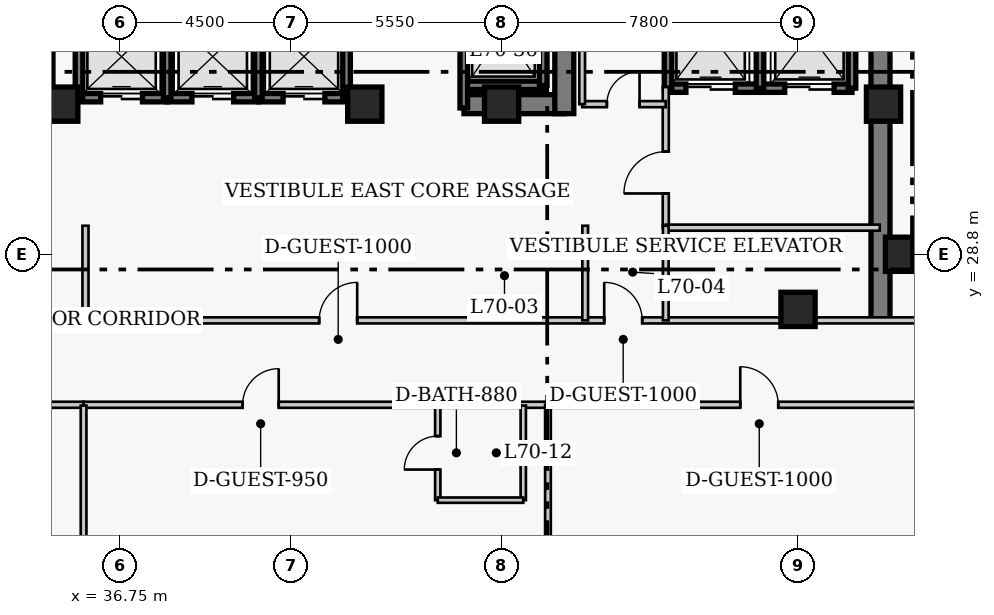
"""IFC4 building model, lengths in metres.
Left out: names, types, materials, properties, quantities, classifications, styles, units other than length and angle.
Written with IfcOpenShell. Run it as: python <this file> out.ifc"""

import sys

from ifc_helpers import new_model, si_unit, direction, frame, frame_2d, origin, origin_2d, place, context, subcontext, project, spatial, rectangle, extrude, element, fill, save


model = new_model("IFC4")
c1 = context("Model", 3, precision=1e-05, world=origin(), true_north=direction((0.0, 1.0)))
c2 = subcontext(c1, "Body", "Model", "MODEL_VIEW")
j1 = project(units=[si_unit("LENGTHUNIT", "METRE"), si_unit("PLANEANGLEUNIT", "RADIAN")], contexts=[c1])
p1 = place(None, origin())
s1 = spatial("IfcSite", under=j1, at=p1, CompositionType="ELEMENT")
p2 = place(p1, origin())
s2 = spatial("IfcBuilding", under=s1, at=p2, CompositionType="ELEMENT")
p3 = place(p2, frame((0.0, 0.0, 281.4)))
s3 = spatial("IfcBuildingStorey", under=s2, at=p3, CompositionType="ELEMENT", Elevation=281.4)
p4 = place(p3, frame((56.77, 27.05, 0.0), z_axis=(0.0, 0.0, 1.0), x_axis=(0.0, 1.0, 0.0)))
e1 = element("IfcWall", 1, at=p4, inside=s3, PredefinedType="SHEAR", context=c2, shape_type="SweptSolid", body=[
    extrude(rectangle(XDim=13.52, YDim=0.5, at=frame_2d((6.76, 0.0))), origin(), (0.0, 0.0, 1.0), 4.0),
])
p5 = place(p3, frame((45.81, 32.75, 0.0), z_axis=(0.0, 0.0, 1.0), x_axis=(1.0, 0.0, 0.0)))
e2 = element("IfcWall", 2, at=p5, inside=s3, PredefinedType="SHEAR", context=c2, shape_type="SweptSolid", body=[
    extrude(rectangle(XDim=2.64, YDim=0.5, at=frame_2d((1.32, 0.0))), origin(), (0.0, 0.0, 1.0), 4.0),
])
p6 = place(p3, frame((48.45, 32.5, 0.0), z_axis=(0.0, 0.0, 1.0), x_axis=(0.0, 1.0, 0.0)))
e3 = element("IfcWall", 3, at=p6, inside=s3, PredefinedType="SHEAR", context=c2, shape_type="SweptSolid", body=[
    extrude(rectangle(XDim=7.82, YDim=0.5, at=frame_2d((3.91, 0.0))), origin(), (0.0, 0.0, 1.0), 4.0),
])
p7 = place(p6, frame((5.7, 0.0, 0.0)))
e4 = element("IfcOpeningElement", 4, at=p7, cuts=e3, PredefinedType="OPENING", context=c2, shape_type="SweptSolid", body=[
    extrude(rectangle(XDim=1.1, YDim=2.15, at=frame_2d((0.55, 1.075))), frame((0.0, 0.26, 0.0), z_axis=(0.0, -1.0, 0.0), x_axis=(1.0, 0.0, 0.0)), (0.0, 0.0, 1.0), 0.52),
])
for number, where, z_axis, x_axis in (
    (5, (57.35, 28.8, 0.0), (0.0, 0.0, 1.0), (1.0, 0.0, 0.0)),
    (6, (35.2, 32.75, 0.0), (0.0, 0.0, 1.0), (1.0, 0.0, 0.0)),
    (7, (43.2, 32.75, 0.0), (0.0, 0.0, 1.0), (1.0, 0.0, 0.0)),
    (8, (46.8, 32.75, 0.0), (0.0, 0.0, 1.0), (1.0, 0.0, 0.0)),
    (9, (54.6, 27.35, 0.0), (0.0, 0.0, 1.0), (1.0, 0.0, 0.0)),
    (10, (56.85, 32.75, 0.0), (0.0, 0.0, 1.0), (1.0, 0.0, 0.0)),
):
    element("IfcColumn", number, at=place(p3, frame(where, z_axis=z_axis, x_axis=x_axis)), inside=s3, PredefinedType="COLUMN", context=c2, shape_type="SweptSolid", body=[
        extrude(rectangle(XDim=0.9, YDim=0.9, at=origin_2d()), origin(), (0.0, 0.0, 1.0), 4.0),
    ])
p8 = place(p3, frame((35.68, 32.92, 0.0), z_axis=(0.0, 0.0, 1.0), x_axis=(1.0, 0.0, 0.0)))
e11 = element("IfcWall", 11, at=p8, inside=s3, PredefinedType="SHEAR", context=c2, shape_type="SweptSolid", body=[
    extrude(rectangle(XDim=2.32, YDim=0.22, at=frame_2d((1.16, 0.0))), origin(), (0.0, 0.0, 1.0), 4.0),
])
p9 = place(p8, frame((0.57, 0.0, 0.0)))
e12 = element("IfcOpeningElement", 12, at=p9, cuts=e11, PredefinedType="OPENING", context=c2, shape_type="SweptSolid", body=[
    extrude(rectangle(XDim=1.1, YDim=2.15, at=frame_2d((0.55, 1.075))), frame((0.0, 0.12, 0.0), z_axis=(0.0, -1.0, 0.0), x_axis=(1.0, 0.0, 0.0)), (0.0, 0.0, 1.0), 0.24),
])
p10 = place(p3, frame((35.68, 32.92, 0.0), z_axis=(0.0, 0.0, 1.0), x_axis=(0.0, 1.0, 0.0)))
e13 = element("IfcWall", 13, at=p10, inside=s3, PredefinedType="SHEAR", context=c2, shape_type="SweptSolid", body=[
    extrude(rectangle(XDim=2.16, YDim=0.2, at=frame_2d((1.08, 0.0))), origin(), (0.0, 0.0, 1.0), 4.0),
])
p11 = place(p3, frame((38.0, 32.92, 0.0), z_axis=(0.0, 0.0, 1.0), x_axis=(1.0, 0.0, 0.0)))
e14 = element("IfcWall", 14, at=p11, inside=s3, PredefinedType="SHEAR", context=c2, shape_type="SweptSolid", body=[
    extrude(rectangle(XDim=2.4, YDim=0.22, at=frame_2d((1.2, 0.0))), origin(), (0.0, 0.0, 1.0), 4.0),
])
p12 = place(p11, frame((0.65, 0.0, 0.0)))
e15 = element("IfcOpeningElement", 15, at=p12, cuts=e14, PredefinedType="OPENING", context=c2, shape_type="SweptSolid", body=[
    extrude(rectangle(XDim=1.1, YDim=2.15, at=frame_2d((0.55, 1.075))), frame((0.0, 0.12, 0.0), z_axis=(0.0, -1.0, 0.0), x_axis=(1.0, 0.0, 0.0)), (0.0, 0.0, 1.0), 0.24),
])
p13 = place(p3, frame((38.0, 32.92, 0.0), z_axis=(0.0, 0.0, 1.0), x_axis=(0.0, 1.0, 0.0)))
e16 = element("IfcWall", 16, at=p13, inside=s3, PredefinedType="SHEAR", context=c2, shape_type="SweptSolid", body=[
    extrude(rectangle(XDim=2.16, YDim=0.2, at=frame_2d((1.08, 0.0))), origin(), (0.0, 0.0, 1.0), 4.0),
])
p14 = place(p3, frame((40.4, 32.92, 0.0), z_axis=(0.0, 0.0, 1.0), x_axis=(1.0, 0.0, 0.0)))
e17 = element("IfcWall", 17, at=p14, inside=s3, PredefinedType="SHEAR", context=c2, shape_type="SweptSolid", body=[
    extrude(rectangle(XDim=2.32, YDim=0.22, at=frame_2d((1.16, 0.0))), origin(), (0.0, 0.0, 1.0), 4.0),
])
p15 = place(p14, frame((0.65, 0.0, 0.0)))
e18 = element("IfcOpeningElement", 18, at=p15, cuts=e17, PredefinedType="OPENING", context=c2, shape_type="SweptSolid", body=[
    extrude(rectangle(XDim=1.1, YDim=2.15, at=frame_2d((0.55, 1.075))), frame((0.0, 0.12, 0.0), z_axis=(0.0, -1.0, 0.0), x_axis=(1.0, 0.0, 0.0)), (0.0, 0.0, 1.0), 0.24),
])
for number, where, z_axis, x_axis in (
    (19, (40.4, 32.92, 0.0), (0.0, 0.0, 1.0), (0.0, 1.0, 0.0)),
    (20, (42.72, 32.92, 0.0), (0.0, 0.0, 1.0), (0.0, 1.0, 0.0)),
):
    element("IfcWall", number, at=place(p3, frame(where, z_axis=z_axis, x_axis=x_axis)), inside=s3, PredefinedType="SHEAR", context=c2, shape_type="SweptSolid", body=[
        extrude(rectangle(XDim=2.16, YDim=0.2, at=frame_2d((1.08, 0.0))), origin(), (0.0, 0.0, 1.0), 4.0),
    ])
p16 = place(p3, frame((51.18, 33.17, 0.0), z_axis=(0.0, 0.0, 1.0), x_axis=(1.0, 0.0, 0.0)))
e21 = element("IfcWall", 21, at=p16, inside=s3, PredefinedType="SHEAR", context=c2, shape_type="SweptSolid", body=[
    extrude(rectangle(XDim=2.42, YDim=0.22, at=frame_2d((1.21, 0.0))), origin(), (0.0, 0.0, 1.0), 4.0),
])
p17 = place(p16, frame((0.47, 0.0, 0.0)))
e22 = element("IfcOpeningElement", 22, at=p17, cuts=e21, PredefinedType="OPENING", context=c2, shape_type="SweptSolid", body=[
    extrude(rectangle(XDim=1.3, YDim=2.15, at=frame_2d((0.65, 1.075))), frame((0.0, 0.12, 0.0), z_axis=(0.0, -1.0, 0.0), x_axis=(1.0, 0.0, 0.0)), (0.0, 0.0, 1.0), 0.24),
])
p18 = place(p3, frame((51.18, 33.17, 0.0), z_axis=(0.0, 0.0, 1.0), x_axis=(0.0, 1.0, 0.0)))
e23 = element("IfcWall", 23, at=p18, inside=s3, PredefinedType="SHEAR", context=c2, shape_type="SweptSolid", body=[
    extrude(rectangle(XDim=2.86, YDim=0.2, at=frame_2d((1.43, 0.0))), origin(), (0.0, 0.0, 1.0), 4.0),
])
p19 = place(p3, frame((53.6, 33.17, 0.0), z_axis=(0.0, 0.0, 1.0), x_axis=(1.0, 0.0, 0.0)))
e24 = element("IfcWall", 24, at=p19, inside=s3, PredefinedType="SHEAR", context=c2, shape_type="SweptSolid", body=[
    extrude(rectangle(XDim=2.42, YDim=0.22, at=frame_2d((1.21, 0.0))), origin(), (0.0, 0.0, 1.0), 4.0),
])
p20 = place(p19, frame((0.65, 0.0, 0.0)))
e25 = element("IfcOpeningElement", 25, at=p20, cuts=e24, PredefinedType="OPENING", context=c2, shape_type="SweptSolid", body=[
    extrude(rectangle(XDim=1.3, YDim=2.15, at=frame_2d((0.65, 1.075))), frame((0.0, 0.12, 0.0), z_axis=(0.0, -1.0, 0.0), x_axis=(1.0, 0.0, 0.0)), (0.0, 0.0, 1.0), 0.24),
])
for number, where, z_axis, x_axis in (
    (26, (53.6, 33.17, 0.0), (0.0, 0.0, 1.0), (0.0, 1.0, 0.0)),
    (27, (56.02, 33.17, 0.0), (0.0, 0.0, 1.0), (0.0, 1.0, 0.0)),
):
    element("IfcWall", number, at=place(p3, frame(where, z_axis=z_axis, x_axis=x_axis)), inside=s3, PredefinedType="SHEAR", context=c2, shape_type="SweptSolid", body=[
        extrude(rectangle(XDim=2.86, YDim=0.2, at=frame_2d((1.43, 0.0))), origin(), (0.0, 0.0, 1.0), 4.0),
    ])
p21 = place(p3, frame((34.895, 33.245, 0.0), z_axis=(0.0, 0.0, 1.0), x_axis=(0.0, 1.0, 0.0)))
e28 = element("IfcWall", 28, at=p21, inside=s3, PredefinedType="SHEAR", context=c2, shape_type="SweptSolid", body=[
    extrude(rectangle(XDim=2.91, YDim=0.2, at=frame_2d((1.455, 0.0))), origin(), (0.0, 0.0, 1.0), 4.0),
])
p22 = place(p3, frame((45.805, 33.245, 0.0), z_axis=(0.0, 0.0, 1.0), x_axis=(1.0, 0.0, 0.0)))
e29 = element("IfcWall", 29, at=p22, inside=s3, PredefinedType="SHEAR", context=c2, shape_type="SweptSolid", body=[
    extrude(rectangle(XDim=2.09, YDim=0.22, at=frame_2d((1.045, 0.0))), origin(), (0.0, 0.0, 1.0), 4.0),
])
p23 = place(p3, frame((45.805, 32.65, 0.0), z_axis=(0.0, 0.0, 1.0), x_axis=(0.0, 1.0, 0.0)))
e30 = element("IfcWall", 30, at=p23, inside=s3, PredefinedType="SHEAR", context=c2, shape_type="SweptSolid", body=[
    extrude(rectangle(XDim=3.505, YDim=0.2, at=frame_2d((1.752, 0.0))), origin(), (0.0, 0.0, 1.0), 4.0),
])
p24 = place(p3, frame((47.895, 33.245, 0.0), z_axis=(0.0, 0.0, 1.0), x_axis=(0.0, 1.0, 0.0)))
e31 = element("IfcWall", 31, at=p24, inside=s3, PredefinedType="SHEAR", context=c2, shape_type="SweptSolid", body=[
    extrude(rectangle(XDim=2.91, YDim=0.2, at=frame_2d((1.455, 0.0))), origin(), (0.0, 0.0, 1.0), 4.0),
])
p25 = place(p3, frame((51.12, 29.5, 0.0), z_axis=(0.0, 0.0, 1.0), x_axis=(0.0, 1.0, 0.0)))
e32 = element("IfcWall", 32, at=p25, inside=s3, PredefinedType="PARTITIONING", context=c2, shape_type="SweptSolid", body=[
    extrude(rectangle(XDim=3.7, YDim=0.16, at=frame_2d((1.85, 0.0))), origin(), (0.0, 0.0, 1.0), 3.76),
])
p26 = place(p25, frame((0.9, 0.0, 0.0)))
e33 = element("IfcOpeningElement", 33, at=p26, cuts=e32, PredefinedType="OPENING", context=c2, shape_type="SweptSolid", body=[
    extrude(rectangle(XDim=1.1, YDim=2.15, at=frame_2d((0.55, 1.075))), frame((0.0, 0.09, 0.0), z_axis=(0.0, -1.0, 0.0), x_axis=(1.0, 0.0, 0.0)), (0.0, 0.0, 1.0), 0.18),
])
p27 = place(p3, frame((51.12, 29.5, 0.0), z_axis=(0.0, 0.0, 1.0), x_axis=(1.0, 0.0, 0.0)))
e34 = element("IfcWall", 34, at=p27, inside=s3, PredefinedType="PARTITIONING", context=c2, shape_type="SweptSolid", body=[
    extrude(rectangle(XDim=5.63, YDim=0.16, at=frame_2d((2.815, 0.0))), origin(), (0.0, 0.0, 1.0), 3.76),
])
p28 = place(p3, frame((48.92, 32.75, 0.0), z_axis=(0.0, 0.0, 1.0), x_axis=(1.0, 0.0, 0.0)))
e35 = element("IfcWall", 35, at=p28, inside=s3, PredefinedType="PARTITIONING", context=c2, shape_type="SweptSolid", body=[
    extrude(rectangle(XDim=2.2, YDim=0.16, at=frame_2d((1.1, 0.0))), origin(), (0.0, 0.0, 1.0), 3.76),
])
p29 = place(p28, frame((0.65, 0.0, 0.0)))
e36 = element("IfcOpeningElement", 36, at=p29, cuts=e35, PredefinedType="OPENING", context=c2, shape_type="SweptSolid", body=[
    extrude(rectangle(XDim=0.86, YDim=2.05, at=frame_2d((0.43, 1.025))), frame((0.0, 0.09, 0.0), z_axis=(0.0, -1.0, 0.0), x_axis=(1.0, 0.0, 0.0)), (0.0, 0.0, 1.0), 0.18),
])
p30 = place(p3, frame((48.92, 32.75, 0.0), z_axis=(0.0, 0.0, 1.0), x_axis=(0.0, 1.0, 0.0)))
e37 = element("IfcWall", 37, at=p30, inside=s3, PredefinedType="PARTITIONING", context=c2, shape_type="SweptSolid", body=[
    extrude(rectangle(XDim=3.62, YDim=0.15, at=frame_2d((1.81, 0.0))), origin(), (0.0, 0.0, 1.0), 3.76),
])
p31 = place(p3, frame((35.85, 27.06, 0.0), z_axis=(0.0, 0.0, 1.0), x_axis=(1.0, 0.0, 0.0)))
e38 = element("IfcWall", 38, at=p31, inside=s3, PredefinedType="PARTITIONING", context=c2, shape_type="SweptSolid", body=[
    extrude(rectangle(XDim=23.35, YDim=0.16, at=frame_2d((11.675, 0.0))), origin(), (0.0, 0.0, 1.0), 3.76),
])
p32 = place(p31, frame((6.15, 0.0, 0.0)))
e39 = element("IfcOpeningElement", 39, at=p32, cuts=e38, PredefinedType="OPENING", context=c2, shape_type="SweptSolid", body=[
    extrude(rectangle(XDim=1.0, YDim=2.15, at=frame_2d((0.5, 1.075))), frame((0.0, 0.09, 0.0), z_axis=(0.0, -1.0, 0.0), x_axis=(1.0, 0.0, 0.0)), (0.0, 0.0, 1.0), 0.18),
])
p33 = place(p31, frame((13.65, 0.0, 0.0)))
e40 = element("IfcOpeningElement", 40, at=p33, cuts=e38, PredefinedType="OPENING", context=c2, shape_type="SweptSolid", body=[
    extrude(rectangle(XDim=1.0, YDim=2.15, at=frame_2d((0.5, 1.075))), frame((0.0, 0.09, 0.0), z_axis=(0.0, -1.0, 0.0), x_axis=(1.0, 0.0, 0.0)), (0.0, 0.0, 1.0), 0.18),
])
p34 = place(p3, frame((35.85, 27.06, 0.0), z_axis=(0.0, 0.0, 1.0), x_axis=(0.0, 1.0, 0.0)))
e41 = element("IfcWall", 41, at=p34, inside=s3, PredefinedType="PARTITIONING", context=c2, shape_type="SweptSolid", body=[
    extrude(rectangle(XDim=2.49, YDim=0.16, at=frame_2d((1.245, 0.0))), origin(), (0.0, 0.0, 1.0), 3.76),
])
p35 = place(p3, frame((18.8, 24.84, 0.0), z_axis=(0.0, 0.0, 1.0), x_axis=(1.0, 0.0, 0.0)))
e42 = element("IfcWall", 42, at=p35, inside=s3, PredefinedType="PARTITIONING", context=c2, shape_type="SweptSolid", body=[
    extrude(rectangle(XDim=17.0, YDim=0.16, at=frame_2d((8.5, 0.0))), origin(), (0.0, 0.0, 1.0), 3.76),
])
p36 = place(p35, frame((3.265, 0.0, 0.0)))
e43 = element("IfcOpeningElement", 43, at=p36, cuts=e42, PredefinedType="OPENING", context=c2, shape_type="SweptSolid", body=[
    extrude(rectangle(XDim=0.95, YDim=2.1, at=frame_2d((0.475, 1.05))), frame((0.0, 0.09, 0.0), z_axis=(0.0, -1.0, 0.0), x_axis=(1.0, 0.0, 0.0)), (0.0, 0.0, 1.0), 0.18),
])
p37 = place(p35, frame((6.052, 0.0, 0.0)))
e44 = element("IfcOpeningElement", 44, at=p37, cuts=e42, PredefinedType="OPENING", context=c2, shape_type="SweptSolid", body=[
    extrude(rectangle(XDim=0.95, YDim=2.1, at=frame_2d((0.475, 1.05))), frame((0.0, 0.09, 0.0), z_axis=(0.0, -1.0, 0.0), x_axis=(1.0, 0.0, 0.0)), (0.0, 0.0, 1.0), 0.18),
])
p38 = place(p35, frame((13.127, 0.0, 0.0)))
e45 = element("IfcOpeningElement", 45, at=p38, cuts=e42, PredefinedType="OPENING", context=c2, shape_type="SweptSolid", body=[
    extrude(rectangle(XDim=1.0, YDim=2.15, at=frame_2d((0.5, 1.075))), frame((0.0, 0.09, 0.0), z_axis=(0.0, -1.0, 0.0), x_axis=(1.0, 0.0, 0.0)), (0.0, 0.0, 1.0), 0.18),
])
p39 = place(p3, frame((35.8, 24.84, 0.0), z_axis=(0.0, 0.0, 1.0), x_axis=(1.0, 0.0, 0.0)))
e46 = element("IfcWall", 46, at=p39, inside=s3, PredefinedType="PARTITIONING", context=c2, shape_type="SweptSolid", body=[
    extrude(rectangle(XDim=25.56, YDim=0.16, at=frame_2d((12.78, 0.0))), origin(), (0.0, 0.0, 1.0), 3.76),
])
p40 = place(p39, frame((4.185, 0.0, 0.0)))
e47 = element("IfcOpeningElement", 47, at=p40, cuts=e46, PredefinedType="OPENING", context=c2, shape_type="SweptSolid", body=[
    extrude(rectangle(XDim=0.95, YDim=2.1, at=frame_2d((0.475, 1.05))), frame((0.0, 0.09, 0.0), z_axis=(0.0, -1.0, 0.0), x_axis=(1.0, 0.0, 0.0)), (0.0, 0.0, 1.0), 0.18),
])
p41 = place(p39, frame((17.28, 0.0, 0.0)))
e48 = element("IfcOpeningElement", 48, at=p41, cuts=e46, PredefinedType="OPENING", context=c2, shape_type="SweptSolid", body=[
    extrude(rectangle(XDim=1.0, YDim=2.15, at=frame_2d((0.5, 1.075))), frame((0.0, 0.09, 0.0), z_axis=(0.0, -1.0, 0.0), x_axis=(1.0, 0.0, 0.0)), (0.0, 0.0, 1.0), 0.18),
])
p42 = place(p39, frame((24.015, 0.0, 0.0)))
e49 = element("IfcOpeningElement", 49, at=p42, cuts=e46, PredefinedType="OPENING", context=c2, shape_type="SweptSolid", body=[
    extrude(rectangle(XDim=0.95, YDim=2.1, at=frame_2d((0.475, 1.05))), frame((0.0, 0.09, 0.0), z_axis=(0.0, -1.0, 0.0), x_axis=(1.0, 0.0, 0.0)), (0.0, 0.0, 1.0), 0.18),
])
for number, where, z_axis, x_axis in (
    (50, (49.0, 27.06, 0.0), (0.0, 0.0, 1.0), (0.0, 1.0, 0.0)),
    (51, (51.12, 27.06, 0.0), (0.0, 0.0, 1.0), (0.0, 1.0, 0.0)),
):
    element("IfcWall", number, at=place(p3, frame(where, z_axis=z_axis, x_axis=x_axis)), inside=s3, PredefinedType="PARTITIONING", context=c2, shape_type="SweptSolid", body=[
        extrude(rectangle(XDim=2.49, YDim=0.15, at=frame_2d((1.245, 0.0))), origin(), (0.0, 0.0, 1.0), 3.76),
    ])
p43 = place(p3, frame((35.8, 6.52, 0.0), z_axis=(0.0, 0.0, 1.0), x_axis=(0.0, 1.0, 0.0)))
e52 = element("IfcWall", 52, at=p43, inside=s3, PredefinedType="PARTITIONING", context=c2, shape_type="SweptSolid", body=[
    extrude(rectangle(XDim=18.3, YDim=0.15, at=frame_2d((9.15, 0.0))), origin(), (0.0, 0.0, 1.0), 3.76),
])
p44 = place(p3, frame((45.12, 22.33, 0.0), z_axis=(0.0, 0.0, 1.0), x_axis=(0.0, 1.0, 0.0)))
e53 = element("IfcWall", 53, at=p44, inside=s3, PredefinedType="PLUMBINGWALL", context=c2, shape_type="SweptSolid", body=[
    extrude(rectangle(XDim=2.49, YDim=0.14, at=frame_2d((1.245, 0.0))), origin(), (0.0, 0.0, 1.0), 3.76),
])
p45 = place(p44, frame((0.805, 0.0, 0.0)))
e54 = element("IfcOpeningElement", 54, at=p45, cuts=e53, PredefinedType="OPENING", context=c2, shape_type="SweptSolid", body=[
    extrude(rectangle(XDim=0.88, YDim=2.05, at=frame_2d((0.44, 1.025))), frame((0.0, 0.08, 0.0), z_axis=(0.0, -1.0, 0.0), x_axis=(1.0, 0.0, 0.0)), (0.0, 0.0, 1.0), 0.16),
])
p46 = place(p3, frame((47.37, 22.33, 0.0), z_axis=(0.0, 0.0, 1.0), x_axis=(0.0, 1.0, 0.0)))
e55 = element("IfcWall", 55, at=p46, inside=s3, PredefinedType="PLUMBINGWALL", context=c2, shape_type="SweptSolid", body=[
    extrude(rectangle(XDim=2.49, YDim=0.14, at=frame_2d((1.245, 0.0))), origin(), (0.0, 0.0, 1.0), 3.76),
])
p47 = place(p3, frame((45.12, 22.33, 0.0), z_axis=(0.0, 0.0, 1.0), x_axis=(1.0, 0.0, 0.0)))
e56 = element("IfcWall", 56, at=p47, inside=s3, PredefinedType="PLUMBINGWALL", context=c2, shape_type="SweptSolid", body=[
    extrude(rectangle(XDim=2.25, YDim=0.14, at=frame_2d((1.125, 0.0))), origin(), (0.0, 0.0, 1.0), 3.76),
])
p48 = place(p3, frame((48.02, 9.72, 0.0), z_axis=(0.0, 0.0, 1.0), x_axis=(0.0, 1.0, 0.0)))
e57 = element("IfcWall", 57, at=p48, inside=s3, PredefinedType="PARTITIONING", context=c2, shape_type="SweptSolid", body=[
    extrude(rectangle(XDim=15.12, YDim=0.15, at=frame_2d((7.56, 0.0))), origin(), (0.0, 0.0, 1.0), 3.76),
])
p49 = place(p9, origin())
e58 = element("IfcDoor", 58, at=p49, inside=s3, OperationType="DOUBLE_DOOR_SLIDING", PredefinedType="DOOR", context=c2, shape_type="SweptSolid", body=[
    extrude(rectangle(XDim=1.1, YDim=2.15, at=frame_2d((0.55, 1.075))), frame((0.0, 0.025, 0.0), z_axis=(0.0, -1.0, 0.0), x_axis=(1.0, 0.0, 0.0)), (0.0, 0.0, 1.0), 0.05),
])
fill(e12, e58)
p50 = place(p12, origin())
e59 = element("IfcDoor", 59, at=p50, inside=s3, OperationType="DOUBLE_DOOR_SLIDING", PredefinedType="DOOR", context=c2, shape_type="SweptSolid", body=[
    extrude(rectangle(XDim=1.1, YDim=2.15, at=frame_2d((0.55, 1.075))), frame((0.0, 0.025, 0.0), z_axis=(0.0, -1.0, 0.0), x_axis=(1.0, 0.0, 0.0)), (0.0, 0.0, 1.0), 0.05),
])
fill(e15, e59)
p51 = place(p15, origin())
e60 = element("IfcDoor", 60, at=p51, inside=s3, OperationType="DOUBLE_DOOR_SLIDING", PredefinedType="DOOR", context=c2, shape_type="SweptSolid", body=[
    extrude(rectangle(XDim=1.1, YDim=2.15, at=frame_2d((0.55, 1.075))), frame((0.0, 0.025, 0.0), z_axis=(0.0, -1.0, 0.0), x_axis=(1.0, 0.0, 0.0)), (0.0, 0.0, 1.0), 0.05),
])
fill(e18, e60)
p52 = place(p17, origin())
e61 = element("IfcDoor", 61, at=p52, inside=s3, OperationType="DOUBLE_DOOR_SLIDING", PredefinedType="DOOR", context=c2, shape_type="SweptSolid", body=[
    extrude(rectangle(XDim=1.3, YDim=2.15, at=frame_2d((0.65, 1.075))), frame((0.0, 0.025, 0.0), z_axis=(0.0, -1.0, 0.0), x_axis=(1.0, 0.0, 0.0)), (0.0, 0.0, 1.0), 0.05),
])
fill(e22, e61)
p53 = place(p20, origin())
e62 = element("IfcDoor", 62, at=p53, inside=s3, OperationType="DOUBLE_DOOR_SLIDING", PredefinedType="DOOR", context=c2, shape_type="SweptSolid", body=[
    extrude(rectangle(XDim=1.3, YDim=2.15, at=frame_2d((0.65, 1.075))), frame((0.0, 0.025, 0.0), z_axis=(0.0, -1.0, 0.0), x_axis=(1.0, 0.0, 0.0)), (0.0, 0.0, 1.0), 0.05),
])
fill(e25, e62)
p54 = place(p26, origin())
e63 = element("IfcDoor", 63, at=p54, inside=s3, OperationType="SINGLE_SWING_LEFT", PredefinedType="DOOR", context=c2, shape_type="SweptSolid", body=[
    extrude(rectangle(XDim=1.1, YDim=2.15, at=frame_2d((0.55, 1.075))), frame((0.0, 0.025, 0.0), z_axis=(0.0, -1.0, 0.0), x_axis=(1.0, 0.0, 0.0)), (0.0, 0.0, 1.0), 0.05),
])
fill(e33, e63)
p55 = place(p29, origin())
e64 = element("IfcDoor", 64, at=p55, inside=s3, OperationType="SINGLE_SWING_RIGHT", PredefinedType="DOOR", context=c2, shape_type="SweptSolid", body=[
    extrude(rectangle(XDim=0.86, YDim=2.05, at=frame_2d((0.43, 1.025))), frame((0.0, 0.025, 0.0), z_axis=(0.0, -1.0, 0.0), x_axis=(1.0, 0.0, 0.0)), (0.0, 0.0, 1.0), 0.05),
])
fill(e36, e64)
p56 = place(p32, origin())
e65 = element("IfcDoor", 65, at=p56, inside=s3, OperationType="SINGLE_SWING_RIGHT", PredefinedType="DOOR", context=c2, shape_type="SweptSolid", body=[
    extrude(rectangle(XDim=1.0, YDim=2.15, at=frame_2d((0.5, 1.075))), frame((0.0, 0.025, 0.0), z_axis=(0.0, -1.0, 0.0), x_axis=(1.0, 0.0, 0.0)), (0.0, 0.0, 1.0), 0.05),
])
fill(e39, e65)
p57 = place(p33, origin())
e66 = element("IfcDoor", 66, at=p57, inside=s3, OperationType="SINGLE_SWING_LEFT", PredefinedType="DOOR", context=c2, shape_type="SweptSolid", body=[
    extrude(rectangle(XDim=1.0, YDim=2.15, at=frame_2d((0.5, 1.075))), frame((0.0, 0.025, 0.0), z_axis=(0.0, -1.0, 0.0), x_axis=(1.0, 0.0, 0.0)), (0.0, 0.0, 1.0), 0.05),
])
fill(e40, e66)
p58 = place(p45, origin())
e67 = element("IfcDoor", 67, at=p58, inside=s3, OperationType="SINGLE_SWING_LEFT", PredefinedType="DOOR", context=c2, shape_type="SweptSolid", body=[
    extrude(rectangle(XDim=0.88, YDim=2.05, at=frame_2d((0.44, 1.025))), frame((0.0, 0.025, 0.0), z_axis=(0.0, -1.0, 0.0), x_axis=(1.0, 0.0, 0.0)), (0.0, 0.0, 1.0), 0.05),
])
fill(e54, e67)
p59 = place(p40, origin())
e68 = element("IfcDoor", 68, at=p59, inside=s3, OperationType="SINGLE_SWING_RIGHT", PredefinedType="DOOR", context=c2, shape_type="SweptSolid", body=[
    extrude(rectangle(XDim=0.95, YDim=2.1, at=frame_2d((0.475, 1.05))), frame((0.0, 0.025, 0.0), z_axis=(0.0, -1.0, 0.0), x_axis=(1.0, 0.0, 0.0)), (0.0, 0.0, 1.0), 0.05),
])
fill(e47, e68)
p60 = place(p41, origin())
e69 = element("IfcDoor", 69, at=p60, inside=s3, OperationType="SINGLE_SWING_LEFT", PredefinedType="DOOR", context=c2, shape_type="SweptSolid", body=[
    extrude(rectangle(XDim=1.0, YDim=2.15, at=frame_2d((0.5, 1.075))), frame((0.0, 0.025, 0.0), z_axis=(0.0, -1.0, 0.0), x_axis=(1.0, 0.0, 0.0)), (0.0, 0.0, 1.0), 0.05),
])
fill(e48, e69)
save(model, sys.argv[1])
